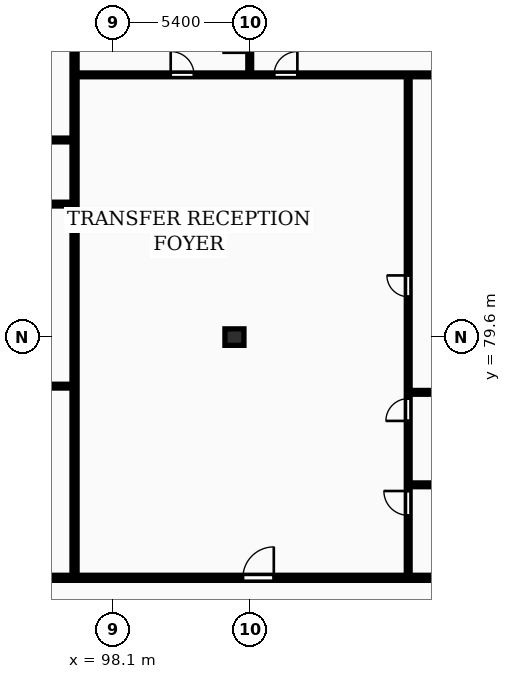
"""IFC4 building model, lengths in metres.
Left out: names, types, materials, properties, quantities, classifications, styles, units other than length and angle.
Written with IfcOpenShell. Run it as: python <this file> out.ifc"""

import sys

from ifc_helpers import new_model, si_unit, direction, frame, frame_2d, origin, origin_2d, place, context, subcontext, project, spatial, rectangle, extrude, element, fill, save


model = new_model("IFC4")
c1 = context("Model", 3, precision=1e-05, world=origin(), true_north=direction((0.0, 1.0)))
c2 = subcontext(c1, "Body", "Model", "MODEL_VIEW")
j1 = project(units=[si_unit("LENGTHUNIT", "METRE"), si_unit("PLANEANGLEUNIT", "RADIAN")], contexts=[c1])
p1 = place(None, origin())
s1 = spatial("IfcSite", under=j1, at=p1, CompositionType="ELEMENT")
p2 = place(p1, origin())
s2 = spatial("IfcBuilding", under=s1, at=p2, CompositionType="ELEMENT")
p3 = place(p2, frame((0.0, 0.0, 249.35)))
s3 = spatial("IfcBuildingStorey", under=s2, at=p3, CompositionType="ELEMENT", Elevation=249.35)
p4 = place(p3, frame((102.9, 79.6, 0.0), z_axis=(0.0, 0.0, 1.0), x_axis=(1.0, 0.0, 0.0)))
e1 = element("IfcColumn", 1, at=p4, inside=s3, PredefinedType="COLUMN", context=c2, shape_type="SweptSolid", body=[
    extrude(rectangle(XDim=0.75, YDim=0.65, at=origin_2d()), origin(), (0.0, 0.0, 1.0), 3.45),
])
p5 = place(p3, frame((96.589, 70.18, 0.0), z_axis=(0.0, 0.0, 1.0), x_axis=(0.0, 1.0, 0.0)))
e2 = element("IfcWall", 2, at=p5, inside=s3, PredefinedType="PARTITIONING", context=c2, shape_type="SweptSolid", body=[
    extrude(rectangle(XDim=24.32, YDim=0.2, at=frame_2d((12.16, 0.0))), origin(), (0.0, 0.0, 1.0), 3.17),
])
p6 = place(p3, frame((82.839, 77.665, 0.0), z_axis=(0.0, 0.0, 1.0), x_axis=(1.0, 0.0, 0.0)))
e3 = element("IfcWall", 3, at=p6, inside=s3, PredefinedType="PARTITIONING", context=c2, shape_type="SweptSolid", body=[
    extrude(rectangle(XDim=13.669, YDim=0.15, at=frame_2d((6.835, 0.0))), origin(), (0.0, 0.0, 1.0), 3.17),
])
p7 = place(p6, frame((5.51, 0.0, 0.0)))
e4 = element("IfcOpeningElement", 4, at=p7, cuts=e3, PredefinedType="OPENING", context=c2, shape_type="SweptSolid", body=[
    extrude(rectangle(XDim=0.88, YDim=2.06, at=frame_2d((0.44, 1.03))), frame((0.0, 0.085, 0.0), z_axis=(0.0, -1.0, 0.0), x_axis=(1.0, 0.0, 0.0)), (0.0, 0.0, 1.0), 0.17),
])
p8 = place(p3, frame((86.42, 87.38, 0.0), z_axis=(0.0, 0.0, 1.0), x_axis=(1.0, 0.0, 0.0)))
e5 = element("IfcWall", 5, at=p8, inside=s3, PredefinedType="PARTITIONING", context=c2, shape_type="SweptSolid", body=[
    extrude(rectangle(XDim=10.089, YDim=0.15, at=frame_2d((5.044, 0.0))), origin(), (0.0, 0.0, 1.0), 3.17),
])
p9 = place(p8, frame((4.31, 0.0, 0.0)))
e6 = element("IfcOpeningElement", 6, at=p9, cuts=e5, PredefinedType="OPENING", context=c2, shape_type="SweptSolid", body=[
    extrude(rectangle(XDim=0.84, YDim=2.04, at=frame_2d((0.42, 1.02))), frame((0.0, 0.085, 0.0), z_axis=(0.0, -1.0, 0.0), x_axis=(1.0, 0.0, 0.0)), (0.0, 0.0, 1.0), 0.17),
])
p10 = place(p8, frame((5.65, 0.0, 0.0)))
e7 = element("IfcOpeningElement", 7, at=p10, cuts=e5, PredefinedType="OPENING", context=c2, shape_type="SweptSolid", body=[
    extrude(rectangle(XDim=0.84, YDim=2.04, at=frame_2d((0.42, 1.02))), frame((0.0, 0.085, 0.0), z_axis=(0.0, -1.0, 0.0), x_axis=(1.0, 0.0, 0.0)), (0.0, 0.0, 1.0), 0.17),
])
p11 = place(p3, frame((78.889, 84.85, 0.0), z_axis=(0.0, 0.0, 1.0), x_axis=(1.0, 0.0, 0.0)))
e8 = element("IfcWall", 8, at=p11, inside=s3, PredefinedType="PARTITIONING", context=c2, shape_type="SweptSolid", body=[
    extrude(rectangle(XDim=17.619, YDim=0.15, at=frame_2d((8.81, 0.0))), origin(), (0.0, 0.0, 1.0), 3.17),
])
p12 = place(p11, frame((2.72, 0.0, 0.0)))
e9 = element("IfcOpeningElement", 9, at=p12, cuts=e8, PredefinedType="OPENING", context=c2, shape_type="SweptSolid", body=[
    extrude(rectangle(XDim=0.92, YDim=2.08, at=frame_2d((0.46, 1.04))), frame((0.0, 0.085, 0.0), z_axis=(0.0, -1.0, 0.0), x_axis=(1.0, 0.0, 0.0)), (0.0, 0.0, 1.0), 0.17),
])
for number, where, z_axis, x_axis in (
    (10, (109.819, 73.77, 0.0), (0.0, 0.0, 1.0), (1.0, 0.0, 0.0)),
    (11, (109.819, 77.42, 0.0), (0.0, 0.0, 1.0), (1.0, 0.0, 0.0)),
):
    element("IfcWall", number, at=place(p3, frame(where, z_axis=z_axis, x_axis=x_axis)), inside=s3, PredefinedType="PARTITIONING", context=c2, shape_type="SweptSolid", body=[
        extrude(rectangle(XDim=3.36, YDim=0.15, at=frame_2d((1.68, 0.0))), origin(), (0.0, 0.0, 1.0), 3.17),
    ])
p13 = place(p3, frame((109.759, 70.16, 0.0), z_axis=(0.0, 0.0, 1.0), x_axis=(0.0, 1.0, 0.0)))
e12 = element("IfcWall", 12, at=p13, inside=s3, PredefinedType="PARTITIONING", context=c2, shape_type="SweptSolid", body=[
    extrude(rectangle(XDim=19.73, YDim=0.15, at=frame_2d((9.865, 0.0))), origin(), (0.0, 0.0, 1.0), 3.17),
])
p14 = place(p13, frame((2.406, 0.0, 0.0)))
e13 = element("IfcOpeningElement", 13, at=p14, cuts=e12, PredefinedType="OPENING", context=c2, shape_type="SweptSolid", body=[
    extrude(rectangle(XDim=0.96, YDim=2.1, at=frame_2d((0.48, 1.05))), frame((0.0, 0.085, 0.0), z_axis=(0.0, -1.0, 0.0), x_axis=(1.0, 0.0, 0.0)), (0.0, 0.0, 1.0), 0.17),
])
p15 = place(p13, frame((6.133, 0.0, 0.0)))
e14 = element("IfcOpeningElement", 14, at=p15, cuts=e12, PredefinedType="OPENING", context=c2, shape_type="SweptSolid", body=[
    extrude(rectangle(XDim=0.88, YDim=2.06, at=frame_2d((0.44, 1.03))), frame((0.0, 0.085, 0.0), z_axis=(0.0, -1.0, 0.0), x_axis=(1.0, 0.0, 0.0)), (0.0, 0.0, 1.0), 0.17),
])
p16 = place(p13, frame((11.034, 0.0, 0.0)))
e15 = element("IfcOpeningElement", 15, at=p16, cuts=e12, PredefinedType="OPENING", context=c2, shape_type="SweptSolid", body=[
    extrude(rectangle(XDim=0.84, YDim=2.04, at=frame_2d((0.42, 1.02))), frame((0.0, 0.085, 0.0), z_axis=(0.0, -1.0, 0.0), x_axis=(1.0, 0.0, 0.0)), (0.0, 0.0, 1.0), 0.17),
])
p17 = place(p3, frame((103.504, 90.03, 0.0), z_axis=(0.0, 0.0, 1.0), x_axis=(0.0, 1.0, 0.0)))
e16 = element("IfcWall", 16, at=p17, inside=s3, PredefinedType="PARTITIONING", context=c2, shape_type="SweptSolid", body=[
    extrude(rectangle(XDim=4.47, YDim=0.15, at=frame_2d((2.235, 0.0))), origin(), (0.0, 0.0, 1.0), 3.17),
])
p18 = place(p3, frame((96.669, 89.95, 0.0), z_axis=(0.0, 0.0, 1.0), x_axis=(1.0, 0.0, 0.0)))
e17 = element("IfcWall", 17, at=p18, inside=s3, PredefinedType="PARTITIONING", context=c2, shape_type="SweptSolid", body=[
    extrude(rectangle(XDim=16.51, YDim=0.15, at=frame_2d((8.255, 0.0))), origin(), (0.0, 0.0, 1.0), 3.17),
])
p19 = place(p18, frame((3.716, 0.0, 0.0)))
e18 = element("IfcOpeningElement", 18, at=p19, cuts=e17, PredefinedType="OPENING", context=c2, shape_type="SweptSolid", body=[
    extrude(rectangle(XDim=0.92, YDim=2.08, at=frame_2d((0.46, 1.04))), frame((0.0, 0.085, 0.0), z_axis=(0.0, -1.0, 0.0), x_axis=(1.0, 0.0, 0.0)), (0.0, 0.0, 1.0), 0.17),
])
p20 = place(p18, frame((7.795, 0.0, 0.0)))
e19 = element("IfcOpeningElement", 19, at=p20, cuts=e17, PredefinedType="OPENING", context=c2, shape_type="SweptSolid", body=[
    extrude(rectangle(XDim=0.92, YDim=2.08, at=frame_2d((0.46, 1.04))), frame((0.0, 0.085, 0.0), z_axis=(0.0, -1.0, 0.0), x_axis=(1.0, 0.0, 0.0)), (0.0, 0.0, 1.0), 0.17),
])
p21 = place(p3, frame((59.8, 70.1, 0.0), z_axis=(0.0, 0.0, 1.0), x_axis=(1.0, 0.0, 0.0)))
e20 = element("IfcWall", 20, at=p21, inside=s3, PredefinedType="PARTITIONING", context=c2, shape_type="SweptSolid", body=[
    extrude(rectangle(XDim=68.6, YDim=0.2, at=frame_2d((34.3, 0.0))), origin(), (0.0, 0.0, 1.0), 3.17),
])
p22 = place(p21, frame((2.045, 0.0, 0.0)))
e21 = element("IfcOpeningElement", 21, at=p22, cuts=e20, PredefinedType="OPENING", context=c2, shape_type="SweptSolid", body=[
    extrude(rectangle(XDim=0.95, YDim=2.15, at=frame_2d((0.475, 1.075))), frame((0.0, 0.11, 0.0), z_axis=(0.0, -1.0, 0.0), x_axis=(1.0, 0.0, 0.0)), (0.0, 0.0, 1.0), 0.22),
])
p23 = place(p21, frame((21.054, 0.0, 0.0)))
e22 = element("IfcOpeningElement", 22, at=p23, cuts=e20, PredefinedType="OPENING", context=c2, shape_type="SweptSolid", body=[
    extrude(rectangle(XDim=0.95, YDim=2.15, at=frame_2d((0.475, 1.075))), frame((0.0, 0.11, 0.0), z_axis=(0.0, -1.0, 0.0), x_axis=(1.0, 0.0, 0.0)), (0.0, 0.0, 1.0), 0.22),
])
p24 = place(p21, frame((43.434, 0.0, 0.0)))
e23 = element("IfcOpeningElement", 23, at=p24, cuts=e20, PredefinedType="OPENING", context=c2, shape_type="SweptSolid", body=[
    extrude(rectangle(XDim=1.22, YDim=2.18, at=frame_2d((0.61, 1.09))), frame((0.0, 0.11, 0.0), z_axis=(0.0, -1.0, 0.0), x_axis=(1.0, 0.0, 0.0)), (0.0, 0.0, 1.0), 0.22),
])
p25 = place(p21, frame((59.455, 0.0, 0.0)))
e24 = element("IfcOpeningElement", 24, at=p25, cuts=e20, PredefinedType="OPENING", context=c2, shape_type="SweptSolid", body=[
    extrude(rectangle(XDim=1.22, YDim=2.18, at=frame_2d((0.61, 1.09))), frame((0.0, 0.11, 0.0), z_axis=(0.0, -1.0, 0.0), x_axis=(1.0, 0.0, 0.0)), (0.0, 0.0, 1.0), 0.22),
])
p26 = place(p14, origin())
e25 = element("IfcDoor", 25, at=p26, inside=s3, OperationType="SINGLE_SWING_RIGHT", PredefinedType="DOOR", context=c2, shape_type="SweptSolid", body=[
    extrude(rectangle(XDim=0.96, YDim=2.1, at=frame_2d((0.48, 1.05))), frame((0.0, 0.025, 0.0), z_axis=(0.0, -1.0, 0.0), x_axis=(1.0, 0.0, 0.0)), (0.0, 0.0, 1.0), 0.05),
])
fill(e13, e25)
p27 = place(p15, origin())
e26 = element("IfcDoor", 26, at=p27, inside=s3, OperationType="SINGLE_SWING_LEFT", PredefinedType="DOOR", context=c2, shape_type="SweptSolid", body=[
    extrude(rectangle(XDim=0.88, YDim=2.06, at=frame_2d((0.44, 1.03))), frame((0.0, 0.025, 0.0), z_axis=(0.0, -1.0, 0.0), x_axis=(1.0, 0.0, 0.0)), (0.0, 0.0, 1.0), 0.05),
])
fill(e14, e26)
p28 = place(p16, origin())
e27 = element("IfcDoor", 27, at=p28, inside=s3, OperationType="SINGLE_SWING_RIGHT", PredefinedType="DOOR", context=c2, shape_type="SweptSolid", body=[
    extrude(rectangle(XDim=0.84, YDim=2.04, at=frame_2d((0.42, 1.02))), frame((0.0, 0.025, 0.0), z_axis=(0.0, -1.0, 0.0), x_axis=(1.0, 0.0, 0.0)), (0.0, 0.0, 1.0), 0.05),
])
fill(e15, e27)
p29 = place(p19, origin())
e28 = element("IfcDoor", 28, at=p29, inside=s3, OperationType="SINGLE_SWING_LEFT", PredefinedType="DOOR", context=c2, shape_type="SweptSolid", body=[
    extrude(rectangle(XDim=0.92, YDim=2.08, at=frame_2d((0.46, 1.04))), frame((0.0, 0.025, 0.0), z_axis=(0.0, -1.0, 0.0), x_axis=(1.0, 0.0, 0.0)), (0.0, 0.0, 1.0), 0.05),
])
fill(e18, e28)
p30 = place(p20, origin())
e29 = element("IfcDoor", 29, at=p30, inside=s3, OperationType="SINGLE_SWING_RIGHT", PredefinedType="DOOR", context=c2, shape_type="SweptSolid", body=[
    extrude(rectangle(XDim=0.92, YDim=2.08, at=frame_2d((0.46, 1.04))), frame((0.0, 0.025, 0.0), z_axis=(0.0, -1.0, 0.0), x_axis=(1.0, 0.0, 0.0)), (0.0, 0.0, 1.0), 0.05),
])
fill(e19, e29)
p31 = place(p24, origin())
e30 = element("IfcDoor", 30, at=p31, inside=s3, OperationType="SINGLE_SWING_RIGHT", PredefinedType="DOOR", context=c2, shape_type="SweptSolid", body=[
    extrude(rectangle(XDim=1.22, YDim=2.18, at=frame_2d((0.61, 1.09))), frame((0.0, 0.025, 0.0), z_axis=(0.0, -1.0, 0.0), x_axis=(1.0, 0.0, 0.0)), (0.0, 0.0, 1.0), 0.05),
])
fill(e23, e30)
save(model, sys.argv[1])
